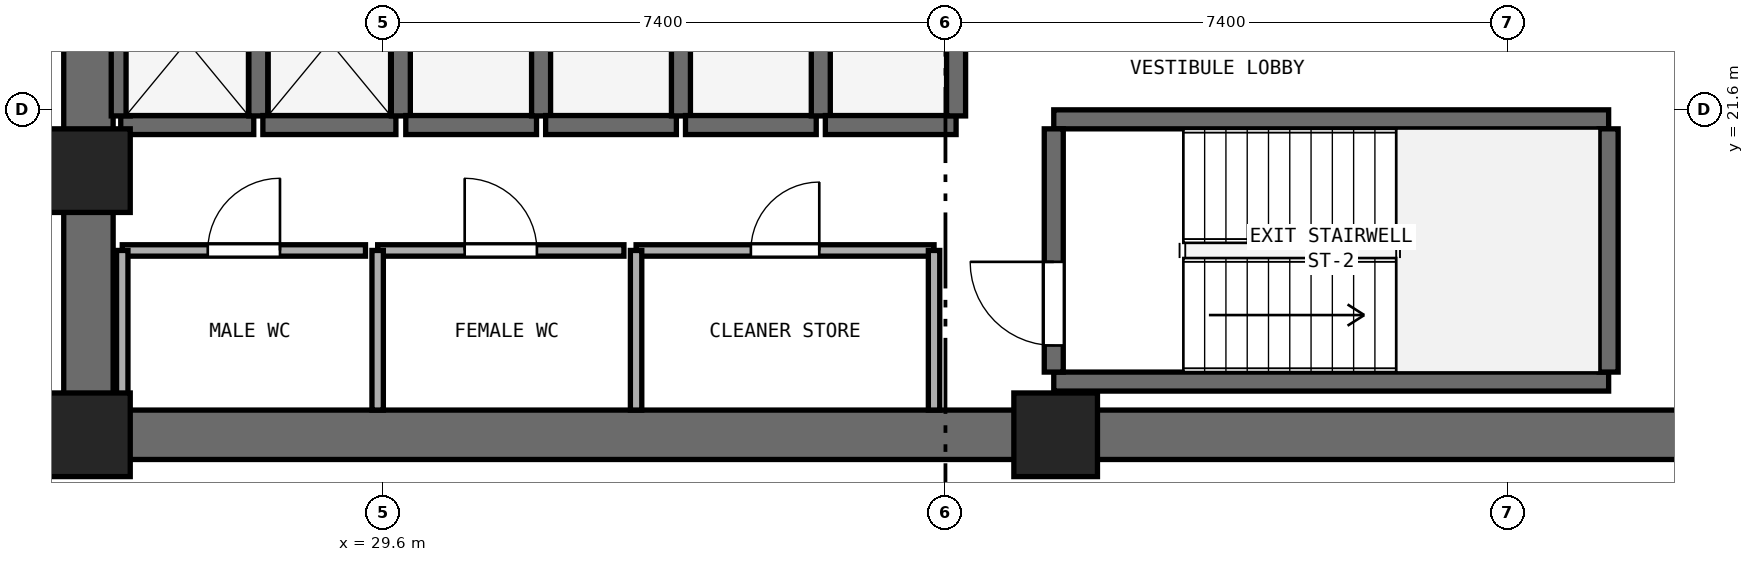
"""IFC4 building model, lengths in metres.
Left out: names, types, materials, properties, quantities, classifications, styles, units other than length and angle.
Written with IfcOpenShell. Run it as: python <this file> out.ifc"""

import sys

from ifc_helpers import new_model, si_unit, direction, frame, frame_2d, origin, origin_2d, place, context, subcontext, project, spatial, rectangle, extrude, element, fill, save


model = new_model("IFC4")
c1 = context("Model", 3, precision=1e-05, world=origin(), true_north=direction((0.0, 1.0)))
c2 = subcontext(c1, "Body", "Model", "MODEL_VIEW")
j1 = project(units=[si_unit("LENGTHUNIT", "METRE"), si_unit("PLANEANGLEUNIT", "RADIAN")], contexts=[c1])
p1 = place(None, origin())
s1 = spatial("IfcSite", under=j1, at=p1, CompositionType="ELEMENT")
p2 = place(p1, origin())
s2 = spatial("IfcBuilding", under=s1, at=p2, CompositionType="ELEMENT")
p3 = place(p2, frame((0.0, 0.0, 78.2)))
s3 = spatial("IfcBuildingStorey", under=s2, at=p3, CompositionType="ELEMENT", Elevation=78.2)
p4 = place(p3, frame((25.4, 17.325, 0.0), z_axis=(0.0, 0.0, 1.0), x_axis=(1.0, 0.0, 0.0)))
e1 = element("IfcWall", 1, at=p4, inside=s3, PredefinedType="SHEAR", context=c2, shape_type="SweptSolid", body=[
    extrude(rectangle(XDim=23.2, YDim=0.65, at=frame_2d((11.6, 0.0))), origin(), (0.0, 0.0, 1.0), 3.525),
])
p5 = place(p3, frame((25.725, 17.65, 0.0), z_axis=(0.0, 0.0, 1.0), x_axis=(0.0, 1.0, 0.0)))
e2 = element("IfcWall", 2, at=p5, inside=s3, PredefinedType="SHEAR", context=c2, shape_type="SweptSolid", body=[
    extrude(rectangle(XDim=15.1, YDim=0.65, at=frame_2d((7.55, 0.0))), origin(), (0.0, 0.0, 1.0), 3.525),
])
p6 = place(p5, frame((6.8, 0.0, 0.0)))
e3 = element("IfcOpeningElement", 3, at=p6, cuts=e2, PredefinedType="OPENING", context=c2, shape_type="SweptSolid", body=[
    extrude(rectangle(XDim=1.5, YDim=2.15, at=frame_2d((0.75, 1.075))), frame((0.0, 0.335, 0.0), z_axis=(0.0, -1.0, 0.0), x_axis=(1.0, 0.0, 0.0)), (0.0, 0.0, 1.0), 0.67),
])
for number, where, z_axis, x_axis in (
    (4, (25.725, 17.325, 0.0), (0.0, 0.0, 1.0), (1.0, 0.0, 0.0)),
    (5, (38.45, 17.325, 0.0), (0.0, 0.0, 1.0), (1.0, 0.0, 0.0)),
    (6, (25.725, 20.8, 0.0), (0.0, 0.0, 1.0), (1.0, 0.0, 0.0)),
):
    element("IfcColumn", number, at=place(p3, frame(where, z_axis=z_axis, x_axis=x_axis)), inside=s3, PredefinedType="PILASTER", context=c2, shape_type="SweptSolid", body=[
        extrude(rectangle(XDim=1.1, YDim=1.1, at=origin_2d()), origin(), (0.0, 0.0, 1.0), 3.8),
    ])
for number, where, z_axis, x_axis in (
    (7, (38.425, 18.025, 0.0), (0.0, 0.0, 1.0), (1.0, 0.0, 0.0)),
    (8, (38.425, 21.475, 0.0), (0.0, 0.0, 1.0), (1.0, 0.0, 0.0)),
):
    element("IfcWall", number, at=place(p3, frame(where, z_axis=z_axis, x_axis=x_axis)), inside=s3, PredefinedType="SHEAR", context=c2, shape_type="SweptSolid", body=[
        extrude(rectangle(XDim=7.3, YDim=0.25, at=frame_2d((3.65, 0.0))), origin(), (0.0, 0.0, 1.0), 3.525),
    ])
p7 = place(p3, frame((38.425, 18.15, 0.0), z_axis=(0.0, 0.0, 1.0), x_axis=(0.0, 1.0, 0.0)))
e9 = element("IfcWall", 9, at=p7, inside=s3, PredefinedType="SHEAR", context=c2, shape_type="SweptSolid", body=[
    extrude(rectangle(XDim=3.2, YDim=0.25, at=frame_2d((1.6, 0.0))), origin(), (0.0, 0.0, 1.0), 3.525),
])
p8 = place(p7, frame((0.35, 0.0, 0.0)))
e10 = element("IfcOpeningElement", 10, at=p8, cuts=e9, PredefinedType="OPENING", context=c2, shape_type="SweptSolid", body=[
    extrude(rectangle(XDim=1.1, YDim=2.15, at=frame_2d((0.55, 1.075))), frame((0.0, 0.135, 0.0), z_axis=(0.0, -1.0, 0.0), x_axis=(1.0, 0.0, 0.0)), (0.0, 0.0, 1.0), 0.27),
])
p9 = place(p3, frame((45.725, 18.15, 0.0), z_axis=(0.0, 0.0, 1.0), x_axis=(0.0, 1.0, 0.0)))
e11 = element("IfcWall", 11, at=p9, inside=s3, PredefinedType="SHEAR", context=c2, shape_type="SweptSolid", body=[
    extrude(rectangle(XDim=3.2, YDim=0.25, at=frame_2d((1.6, 0.0))), origin(), (0.0, 0.0, 1.0), 3.525),
])
p10 = place(p3, frame((26.15, 21.4, 0.0), z_axis=(0.0, 0.0, 1.0), x_axis=(1.0, 0.0, 0.0)))
e12 = element("IfcWall", 12, at=p10, inside=s3, PredefinedType="SHEAR", context=c2, shape_type="SweptSolid", body=[
    extrude(rectangle(XDim=1.75, YDim=0.25, at=frame_2d((0.875, 0.0))), origin(), (0.0, 0.0, 1.0), 3.525),
])
for number, where, z_axis, x_axis in (
    (13, (26.15, 21.52, 0.0), (0.0, 0.0, 1.0), (0.0, 1.0, 0.0)),
    (14, (27.96, 21.52, 0.0), (0.0, 0.0, 1.0), (0.0, 1.0, 0.0)),
):
    element("IfcWall", number, at=place(p3, frame(where, z_axis=z_axis, x_axis=x_axis)), inside=s3, PredefinedType="SHEAR", context=c2, shape_type="SweptSolid", body=[
        extrude(rectangle(XDim=1.96, YDim=0.25, at=frame_2d((0.98, 0.0))), origin(), (0.0, 0.0, 1.0), 3.525),
    ])
p11 = place(p3, frame((28.02, 21.4, 0.0), z_axis=(0.0, 0.0, 1.0), x_axis=(1.0, 0.0, 0.0)))
e15 = element("IfcWall", 15, at=p11, inside=s3, PredefinedType="SHEAR", context=c2, shape_type="SweptSolid", body=[
    extrude(rectangle(XDim=1.75, YDim=0.25, at=frame_2d((0.875, 0.0))), origin(), (0.0, 0.0, 1.0), 3.525),
])
p12 = place(p3, frame((29.835, 21.52, 0.0), z_axis=(0.0, 0.0, 1.0), x_axis=(0.0, 1.0, 0.0)))
e16 = element("IfcWall", 16, at=p12, inside=s3, PredefinedType="SHEAR", context=c2, shape_type="SweptSolid", body=[
    extrude(rectangle(XDim=1.96, YDim=0.25, at=frame_2d((0.98, 0.0))), origin(), (0.0, 0.0, 1.0), 3.525),
])
p13 = place(p3, frame((29.9, 21.4, 0.0), z_axis=(0.0, 0.0, 1.0), x_axis=(1.0, 0.0, 0.0)))
e17 = element("IfcWall", 17, at=p13, inside=s3, PredefinedType="SHEAR", context=c2, shape_type="SweptSolid", body=[
    extrude(rectangle(XDim=1.72, YDim=0.25, at=frame_2d((0.86, 0.0))), origin(), (0.0, 0.0, 1.0), 3.525),
])
p14 = place(p3, frame((31.68, 21.52, 0.0), z_axis=(0.0, 0.0, 1.0), x_axis=(0.0, 1.0, 0.0)))
e18 = element("IfcWall", 18, at=p14, inside=s3, PredefinedType="SHEAR", context=c2, shape_type="SweptSolid", body=[
    extrude(rectangle(XDim=1.96, YDim=0.25, at=frame_2d((0.98, 0.0))), origin(), (0.0, 0.0, 1.0), 3.525),
])
p15 = place(p3, frame((31.74, 21.4, 0.0), z_axis=(0.0, 0.0, 1.0), x_axis=(1.0, 0.0, 0.0)))
e19 = element("IfcWall", 19, at=p15, inside=s3, PredefinedType="SHEAR", context=c2, shape_type="SweptSolid", body=[
    extrude(rectangle(XDim=1.72, YDim=0.25, at=frame_2d((0.86, 0.0))), origin(), (0.0, 0.0, 1.0), 3.525),
])
p16 = place(p3, frame((33.52, 21.52, 0.0), z_axis=(0.0, 0.0, 1.0), x_axis=(0.0, 1.0, 0.0)))
e20 = element("IfcWall", 20, at=p16, inside=s3, PredefinedType="SHEAR", context=c2, shape_type="SweptSolid", body=[
    extrude(rectangle(XDim=1.96, YDim=0.25, at=frame_2d((0.98, 0.0))), origin(), (0.0, 0.0, 1.0), 3.525),
])
p17 = place(p3, frame((33.58, 21.4, 0.0), z_axis=(0.0, 0.0, 1.0), x_axis=(1.0, 0.0, 0.0)))
e21 = element("IfcWall", 21, at=p17, inside=s3, PredefinedType="SHEAR", context=c2, shape_type="SweptSolid", body=[
    extrude(rectangle(XDim=1.72, YDim=0.25, at=frame_2d((0.86, 0.0))), origin(), (0.0, 0.0, 1.0), 3.525),
])
p18 = place(p3, frame((35.36, 21.52, 0.0), z_axis=(0.0, 0.0, 1.0), x_axis=(0.0, 1.0, 0.0)))
e22 = element("IfcWall", 22, at=p18, inside=s3, PredefinedType="SHEAR", context=c2, shape_type="SweptSolid", body=[
    extrude(rectangle(XDim=1.96, YDim=0.25, at=frame_2d((0.98, 0.0))), origin(), (0.0, 0.0, 1.0), 3.525),
])
p19 = place(p3, frame((35.42, 21.4, 0.0), z_axis=(0.0, 0.0, 1.0), x_axis=(1.0, 0.0, 0.0)))
e23 = element("IfcWall", 23, at=p19, inside=s3, PredefinedType="SHEAR", context=c2, shape_type="SweptSolid", body=[
    extrude(rectangle(XDim=1.72, YDim=0.25, at=frame_2d((0.86, 0.0))), origin(), (0.0, 0.0, 1.0), 3.525),
])
p20 = place(p3, frame((37.14, 21.52, 0.0), z_axis=(0.0, 0.0, 1.0), x_axis=(0.0, 1.0, 0.0)))
e24 = element("IfcWall", 24, at=p20, inside=s3, PredefinedType="SHEAR", context=c2, shape_type="SweptSolid", body=[
    extrude(rectangle(XDim=1.96, YDim=0.25, at=frame_2d((0.98, 0.0))), origin(), (0.0, 0.0, 1.0), 3.525),
])
p21 = place(p3, frame((26.17, 19.75, 0.0), z_axis=(0.0, 0.0, 1.0), x_axis=(1.0, 0.0, 0.0)))
e25 = element("IfcWall", 25, at=p21, inside=s3, PredefinedType="PARTITIONING", context=c2, shape_type="SweptSolid", body=[
    extrude(rectangle(XDim=3.2, YDim=0.15, at=frame_2d((1.6, 0.0))), origin(), (0.0, 0.0, 1.0), 3.525),
])
p22 = place(p21, frame((1.125, 0.0, 0.0)))
e26 = element("IfcOpeningElement", 26, at=p22, cuts=e25, PredefinedType="OPENING", context=c2, shape_type="SweptSolid", body=[
    extrude(rectangle(XDim=0.95, YDim=2.1, at=frame_2d((0.475, 1.05))), frame((0.0, 0.085, 0.0), z_axis=(0.0, -1.0, 0.0), x_axis=(1.0, 0.0, 0.0)), (0.0, 0.0, 1.0), 0.17),
])
p23 = place(p3, frame((26.17, 17.65, 0.0), z_axis=(0.0, 0.0, 1.0), x_axis=(0.0, 1.0, 0.0)))
e27 = element("IfcWall", 27, at=p23, inside=s3, PredefinedType="PARTITIONING", context=c2, shape_type="SweptSolid", body=[
    extrude(rectangle(XDim=2.1, YDim=0.15, at=frame_2d((1.05, 0.0))), origin(), (0.0, 0.0, 1.0), 3.525),
])
p24 = place(p3, frame((29.53, 19.75, 0.0), z_axis=(0.0, 0.0, 1.0), x_axis=(1.0, 0.0, 0.0)))
e28 = element("IfcWall", 28, at=p24, inside=s3, PredefinedType="PARTITIONING", context=c2, shape_type="SweptSolid", body=[
    extrude(rectangle(XDim=3.24, YDim=0.15, at=frame_2d((1.62, 0.0))), origin(), (0.0, 0.0, 1.0), 3.525),
])
p25 = place(p24, frame((1.145, 0.0, 0.0)))
e29 = element("IfcOpeningElement", 29, at=p25, cuts=e28, PredefinedType="OPENING", context=c2, shape_type="SweptSolid", body=[
    extrude(rectangle(XDim=0.95, YDim=2.1, at=frame_2d((0.475, 1.05))), frame((0.0, 0.085, 0.0), z_axis=(0.0, -1.0, 0.0), x_axis=(1.0, 0.0, 0.0)), (0.0, 0.0, 1.0), 0.17),
])
p26 = place(p3, frame((29.53, 17.65, 0.0), z_axis=(0.0, 0.0, 1.0), x_axis=(0.0, 1.0, 0.0)))
e30 = element("IfcWall", 30, at=p26, inside=s3, PredefinedType="PARTITIONING", context=c2, shape_type="SweptSolid", body=[
    extrude(rectangle(XDim=2.1, YDim=0.15, at=frame_2d((1.05, 0.0))), origin(), (0.0, 0.0, 1.0), 3.525),
])
p27 = place(p3, frame((32.93, 19.75, 0.0), z_axis=(0.0, 0.0, 1.0), x_axis=(1.0, 0.0, 0.0)))
e31 = element("IfcWall", 31, at=p27, inside=s3, PredefinedType="PARTITIONING", context=c2, shape_type="SweptSolid", body=[
    extrude(rectangle(XDim=3.92, YDim=0.15, at=frame_2d((1.96, 0.0))), origin(), (0.0, 0.0, 1.0), 3.525),
])
p28 = place(p27, frame((1.51, 0.0, 0.0)))
e32 = element("IfcOpeningElement", 32, at=p28, cuts=e31, PredefinedType="OPENING", context=c2, shape_type="SweptSolid", body=[
    extrude(rectangle(XDim=0.9, YDim=2.1, at=frame_2d((0.45, 1.05))), frame((0.0, 0.085, 0.0), z_axis=(0.0, -1.0, 0.0), x_axis=(1.0, 0.0, 0.0)), (0.0, 0.0, 1.0), 0.17),
])
for number, where, z_axis, x_axis in (
    (33, (32.93, 17.65, 0.0), (0.0, 0.0, 1.0), (0.0, 1.0, 0.0)),
    (34, (36.85, 17.65, 0.0), (0.0, 0.0, 1.0), (0.0, 1.0, 0.0)),
):
    element("IfcWall", number, at=place(p3, frame(where, z_axis=z_axis, x_axis=x_axis)), inside=s3, PredefinedType="PARTITIONING", context=c2, shape_type="SweptSolid", body=[
        extrude(rectangle(XDim=2.1, YDim=0.15, at=frame_2d((1.05, 0.0))), origin(), (0.0, 0.0, 1.0), 3.525),
    ])
p29 = place(p8, origin())
e35 = element("IfcDoor", 35, at=p29, inside=s3, OperationType="SINGLE_SWING_RIGHT", PredefinedType="DOOR", context=c2, shape_type="SweptSolid", body=[
    extrude(rectangle(XDim=1.1, YDim=2.15, at=frame_2d((0.55, 1.075))), frame((0.0, 0.025, 0.0), z_axis=(0.0, -1.0, 0.0), x_axis=(1.0, 0.0, 0.0)), (0.0, 0.0, 1.0), 0.05),
])
fill(e10, e35)
p30 = place(p22, origin())
e36 = element("IfcDoor", 36, at=p30, inside=s3, OperationType="SINGLE_SWING_RIGHT", PredefinedType="DOOR", context=c2, shape_type="SweptSolid", body=[
    extrude(rectangle(XDim=0.95, YDim=2.1, at=frame_2d((0.475, 1.05))), frame((0.0, 0.025, 0.0), z_axis=(0.0, -1.0, 0.0), x_axis=(1.0, 0.0, 0.0)), (0.0, 0.0, 1.0), 0.05),
])
fill(e26, e36)
p31 = place(p25, origin())
e37 = element("IfcDoor", 37, at=p31, inside=s3, OperationType="SINGLE_SWING_LEFT", PredefinedType="DOOR", context=c2, shape_type="SweptSolid", body=[
    extrude(rectangle(XDim=0.95, YDim=2.1, at=frame_2d((0.475, 1.05))), frame((0.0, 0.025, 0.0), z_axis=(0.0, -1.0, 0.0), x_axis=(1.0, 0.0, 0.0)), (0.0, 0.0, 1.0), 0.05),
])
fill(e29, e37)
p32 = place(p28, origin())
e38 = element("IfcDoor", 38, at=p32, inside=s3, OperationType="SINGLE_SWING_RIGHT", PredefinedType="DOOR", context=c2, shape_type="SweptSolid", body=[
    extrude(rectangle(XDim=0.9, YDim=2.1, at=frame_2d((0.45, 1.05))), frame((0.0, 0.025, 0.0), z_axis=(0.0, -1.0, 0.0), x_axis=(1.0, 0.0, 0.0)), (0.0, 0.0, 1.0), 0.05),
])
fill(e32, e38)
save(model, sys.argv[1])
